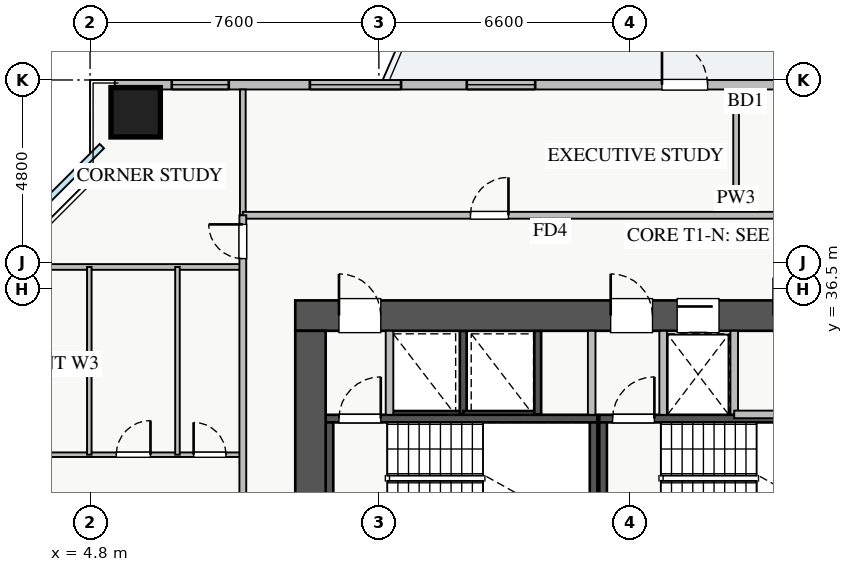
"""IFC4 building model, lengths in metres.
Left out: names, types, materials, properties, quantities, classifications, styles, units other than length and angle.
Written with IfcOpenShell. Run it as: python <this file> out.ifc"""

import sys

from ifc_helpers import new_model, si_unit, direction, frame, frame_2d, origin, origin_2d, place, context, subcontext, project, spatial, rectangle, extrude, source, transform, mapped, element, fill, save


model = new_model("IFC4")
c1 = context("Model", 3, precision=1e-05, world=origin(), true_north=direction((0.0, 1.0)))
c2 = subcontext(c1, "Body", "Model", "MODEL_VIEW")
j1 = project(units=[si_unit("LENGTHUNIT", "METRE"), si_unit("PLANEANGLEUNIT", "RADIAN")], contexts=[c1])
p1 = place(None, origin())
s1 = spatial("IfcSite", under=j1, at=p1, CompositionType="ELEMENT")
p2 = place(p1, origin())
s2 = spatial("IfcBuilding", under=s1, at=p2, CompositionType="ELEMENT")
p3 = place(p2, frame((0.0, 0.0, 56.75)))
s3 = spatial("IfcBuildingStorey", under=s2, at=p3, CompositionType="ELEMENT", Elevation=56.75)
p4 = place(p3, frame((12.68, 33.2, 0.0), z_axis=(0.0, 0.0, 1.0), x_axis=(1.0, 0.0, 0.0)))
e1 = element("IfcWall", 1, at=p4, inside=s3, PredefinedType="SHEAR", context=c2, shape_type="SweptSolid", body=[
    extrude(rectangle(XDim=1.94, YDim=0.18, at=frame_2d((0.97, 0.0))), origin(), (0.0, 0.0, 1.0), 3.07),
])
p5 = place(p3, frame((14.62, 33.2, 0.0), z_axis=(0.0, 0.0, 1.0), x_axis=(0.0, 1.0, 0.0)))
e2 = element("IfcWall", 2, at=p5, inside=s3, PredefinedType="SHEAR", context=c2, shape_type="SweptSolid", body=[
    extrude(rectangle(XDim=2.2, YDim=0.18, at=frame_2d((1.1, 0.0))), origin(), (0.0, 0.0, 1.0), 3.07),
])
p6 = place(p3, frame((14.62, 33.2, 0.0), z_axis=(0.0, 0.0, 1.0), x_axis=(1.0, 0.0, 0.0)))
e3 = element("IfcWall", 3, at=p6, inside=s3, PredefinedType="SHEAR", context=c2, shape_type="SweptSolid", body=[
    extrude(rectangle(XDim=1.96, YDim=0.18, at=frame_2d((0.98, 0.0))), origin(), (0.0, 0.0, 1.0), 3.07),
])
p7 = place(p3, frame((16.58, 33.2, 0.0), z_axis=(0.0, 0.0, 1.0), x_axis=(0.0, 1.0, 0.0)))
e4 = element("IfcWall", 4, at=p7, inside=s3, PredefinedType="SHEAR", context=c2, shape_type="SweptSolid", body=[
    extrude(rectangle(XDim=2.2, YDim=0.18, at=frame_2d((1.1, 0.0))), origin(), (0.0, 0.0, 1.0), 3.07),
])
p8 = place(p3, frame((19.88, 33.2, 0.0), z_axis=(0.0, 0.0, 1.0), x_axis=(1.0, 0.0, 0.0)))
e5 = element("IfcWall", 5, at=p8, inside=s3, PredefinedType="SHEAR", context=c2, shape_type="SweptSolid", body=[
    extrude(rectangle(XDim=1.87, YDim=0.18, at=frame_2d((0.935, 0.0))), origin(), (0.0, 0.0, 1.0), 3.07),
])
p9 = place(p3, frame((11.0, 33.09, 0.0), z_axis=(0.0, 0.0, 1.0), x_axis=(1.0, 0.0, 0.0)))
e6 = element("IfcWall", 6, at=p9, inside=s3, PredefinedType="SHEAR", context=c2, shape_type="SweptSolid", body=[
    extrude(rectangle(XDim=7.15, YDim=0.2, at=frame_2d((3.575, 0.0))), origin(), (0.0, 0.0, 1.0), 3.25),
])
p10 = place(p9, frame((0.35, 0.0, 0.0)))
e7 = element("IfcOpeningElement", 7, at=p10, cuts=e6, PredefinedType="OPENING", context=c2, shape_type="SweptSolid", body=[
    extrude(rectangle(XDim=1.1, YDim=2.05, at=frame_2d((0.55, 1.025))), frame((0.0, 0.11, 0.0), z_axis=(0.0, -1.0, 0.0), x_axis=(1.0, 0.0, 0.0)), (0.0, 0.0, 1.0), 0.22),
])
for number, where, z_axis, x_axis in (
    (8, (11.1, 30.05, 0.0), (0.0, 0.0, 1.0), (0.0, 1.0, 0.0)),
    (9, (18.05, 30.05, 0.0), (0.0, 0.0, 1.0), (0.0, 1.0, 0.0)),
):
    element("IfcWall", number, at=place(p3, frame(where, z_axis=z_axis, x_axis=x_axis)), inside=s3, PredefinedType="SHEAR", context=c2, shape_type="SweptSolid", body=[
        extrude(rectangle(XDim=2.94, YDim=0.2, at=frame_2d((1.47, 0.0))), origin(), (0.0, 0.0, 1.0), 3.25),
    ])
p11 = place(p3, frame((18.2, 33.09, 0.0), z_axis=(0.0, 0.0, 1.0), x_axis=(1.0, 0.0, 0.0)))
e10 = element("IfcWall", 10, at=p11, inside=s3, PredefinedType="SHEAR", context=c2, shape_type="SweptSolid", body=[
    extrude(rectangle(XDim=7.15, YDim=0.2, at=frame_2d((3.575, 0.0))), origin(), (0.0, 0.0, 1.0), 3.25),
])
p12 = place(p11, frame((0.35, 0.0, 0.0)))
e11 = element("IfcOpeningElement", 11, at=p12, cuts=e10, PredefinedType="OPENING", context=c2, shape_type="SweptSolid", body=[
    extrude(rectangle(XDim=1.1, YDim=2.05, at=frame_2d((0.55, 1.025))), frame((0.0, 0.11, 0.0), z_axis=(0.0, -1.0, 0.0), x_axis=(1.0, 0.0, 0.0)), (0.0, 0.0, 1.0), 0.22),
])
p13 = place(p3, frame((18.3, 30.05, 0.0), z_axis=(0.0, 0.0, 1.0), x_axis=(0.0, 1.0, 0.0)))
e12 = element("IfcWall", 12, at=p13, inside=s3, PredefinedType="SHEAR", context=c2, shape_type="SweptSolid", body=[
    extrude(rectangle(XDim=2.94, YDim=0.2, at=frame_2d((1.47, 0.0))), origin(), (0.0, 0.0, 1.0), 3.25),
])
p14 = place(p3, frame((10.2, 35.8, 0.0), z_axis=(0.0, 0.0, 1.0), x_axis=(1.0, 0.0, 0.0)))
e13 = element("IfcWall", 13, at=p14, inside=s3, PredefinedType="SHEAR", context=c2, shape_type="SweptSolid", body=[
    extrude(rectangle(XDim=17.6, YDim=0.8, at=frame_2d((8.8, 0.0))), origin(), (0.0, 0.0, 1.0), 3.25),
])
p15 = place(p14, frame((1.15, 0.0, 0.0)))
e14 = element("IfcOpeningElement", 14, at=p15, cuts=e13, PredefinedType="OPENING", context=c2, shape_type="SweptSolid", body=[
    extrude(rectangle(XDim=1.1, YDim=2.05, at=frame_2d((0.55, 1.025))), frame((0.0, 0.41, 0.0), z_axis=(0.0, -1.0, 0.0), x_axis=(1.0, 0.0, 0.0)), (0.0, 0.0, 1.0), 0.82),
])
p16 = place(p14, frame((8.3, 0.0, 0.0)))
e15 = element("IfcOpeningElement", 15, at=p16, cuts=e13, PredefinedType="OPENING", context=c2, shape_type="SweptSolid", body=[
    extrude(rectangle(XDim=1.1, YDim=2.05, at=frame_2d((0.55, 1.025))), frame((0.0, 0.41, 0.0), z_axis=(0.0, -1.0, 0.0), x_axis=(1.0, 0.0, 0.0)), (0.0, 0.0, 1.0), 0.82),
])
p17 = place(p14, frame((10.05, 0.0, 0.0)))
e16 = element("IfcOpeningElement", 16, at=p17, cuts=e13, PredefinedType="OPENING", context=c2, shape_type="SweptSolid", body=[
    extrude(rectangle(XDim=1.1, YDim=2.05, at=frame_2d((0.55, 1.025))), frame((0.0, 0.41, 0.0), z_axis=(0.0, -1.0, 0.0), x_axis=(1.0, 0.0, 0.0)), (0.0, 0.0, 1.0), 0.82),
])
p18 = place(p14, frame((14.74, 0.0, 0.0)))
e17 = element("IfcOpeningElement", 17, at=p18, cuts=e13, PredefinedType="OPENING", context=c2, shape_type="SweptSolid", body=[
    extrude(rectangle(XDim=1.0, YDim=2.05, at=frame_2d((0.5, 1.025))), frame((0.0, 0.41, 0.0), z_axis=(0.0, -1.0, 0.0), x_axis=(1.0, 0.0, 0.0)), (0.0, 0.0, 1.0), 0.82),
])
p19 = place(p14, frame((12.585, 0.0, 0.0)))
e18 = element("IfcOpeningElement", 18, at=p19, cuts=e13, PredefinedType="OPENING", context=c2, shape_type="SweptSolid", body=[
    extrude(rectangle(XDim=1.0, YDim=2.05, at=frame_2d((0.5, 1.025))), frame((0.0, 0.41, 0.0), z_axis=(0.0, -1.0, 0.0), x_axis=(1.0, 0.0, 0.0)), (0.0, 0.0, 1.0), 0.82),
])
p20 = place(p3, frame((10.6, 29.8, 0.0), z_axis=(0.0, 0.0, 1.0), x_axis=(0.0, 1.0, 0.0)))
e19 = element("IfcWall", 19, at=p20, inside=s3, PredefinedType="SHEAR", context=c2, shape_type="SweptSolid", body=[
    extrude(rectangle(XDim=5.6, YDim=0.8, at=frame_2d((2.8, 0.0))), origin(), (0.0, 0.0, 1.0), 3.25),
])
m1 = source(origin(), c2, "Body", "SweptSolid", [
    extrude(rectangle(XDim=1.3, YDim=1.3, at=origin_2d()), origin(), (0.0, 0.0, 1.0), 3.25),
])
p21 = place(p3, frame((6.0, 41.15, 0.0), z_axis=(0.0, 0.0, 1.0), x_axis=(1.0, 0.0, 0.0)))
e20 = element("IfcColumn", 20, at=p21, inside=s3, PredefinedType="COLUMN", context=c2, shape_type="MappedRepresentation", body=[
    mapped(m1, transform((0.0, 0.0, 0.0), x_axis=(1.0, 0.0, 0.0), y_axis=(0.0, 1.0, 0.0), z_axis=(0.0, 0.0, 1.0), scale=1.0)),
])
p22 = place(p3, frame((5.45, 41.875, 0.0), z_axis=(0.0, 0.0, 1.0), x_axis=(1.0, 0.0, 0.0)))
e21 = element("IfcWall", 21, at=p22, inside=s3, PredefinedType="STANDARD", context=c2, shape_type="SweptSolid", body=[
    extrude(rectangle(XDim=27.1, YDim=0.25, at=frame_2d((13.55, 0.0))), origin(), (0.0, 0.0, 1.0), 2.61),
])
p23 = place(p22, frame((14.4, 0.0, 0.0)))
e22 = element("IfcOpeningElement", 22, at=p23, cuts=e21, PredefinedType="OPENING", context=c2, shape_type="SweptSolid", body=[
    extrude(rectangle(XDim=1.2, YDim=2.1, at=frame_2d((0.6, 1.05))), frame((0.0, 0.135, 0.0), z_axis=(0.0, -1.0, 0.0), x_axis=(1.0, 0.0, 0.0)), (0.0, 0.0, 1.0), 0.27),
])
p24 = place(p22, frame((1.5, 0.0, 0.9)))
e23 = element("IfcOpeningElement", 23, at=p24, cuts=e21, PredefinedType="OPENING", context=c2, shape_type="SweptSolid", body=[
    extrude(rectangle(XDim=1.5, YDim=1.5, at=frame_2d((0.75, 0.75))), frame((0.0, 0.135, 0.0), z_axis=(0.0, -1.0, 0.0), x_axis=(1.0, 0.0, 0.0)), (0.0, 0.0, 1.0), 0.27),
])
p25 = place(p22, frame((9.263, 0.0, 0.9)))
e24 = element("IfcOpeningElement", 24, at=p25, cuts=e21, PredefinedType="OPENING", context=c2, shape_type="SweptSolid", body=[
    extrude(rectangle(XDim=1.8, YDim=1.45, at=frame_2d((0.9, 0.725))), frame((0.0, 0.135, 0.0), z_axis=(0.0, -1.0, 0.0), x_axis=(1.0, 0.0, 0.0)), (0.0, 0.0, 1.0), 0.27),
])
p26 = place(p22, frame((18.774, 0.0, 0.9)))
e25 = element("IfcOpeningElement", 25, at=p26, cuts=e21, PredefinedType="OPENING", context=c2, shape_type="SweptSolid", body=[
    extrude(rectangle(XDim=1.5, YDim=1.5, at=frame_2d((0.75, 0.75))), frame((0.0, 0.135, 0.0), z_axis=(0.0, -1.0, 0.0), x_axis=(1.0, 0.0, 0.0)), (0.0, 0.0, 1.0), 0.27),
])
p27 = place(p22, frame((22.663, 0.0, 0.9)))
e26 = element("IfcOpeningElement", 26, at=p27, cuts=e21, PredefinedType="OPENING", context=c2, shape_type="SweptSolid", body=[
    extrude(rectangle(XDim=2.1, YDim=1.48, at=frame_2d((1.05, 0.74))), frame((0.0, 0.135, 0.0), z_axis=(0.0, -1.0, 0.0), x_axis=(1.0, 0.0, 0.0)), (0.0, 0.0, 1.0), 0.27),
])
p28 = place(p22, frame((5.134, 0.0, 0.9)))
e27 = element("IfcOpeningElement", 27, at=p28, cuts=e21, PredefinedType="OPENING", context=c2, shape_type="SweptSolid", body=[
    extrude(rectangle(XDim=2.4, YDim=1.5, at=frame_2d((1.2, 0.75))), frame((0.0, 0.135, 0.0), z_axis=(0.0, -1.0, 0.0), x_axis=(1.0, 0.0, 0.0)), (0.0, 0.0, 1.0), 0.27),
])
for number, where, z_axis, x_axis in (
    (28, (12.68, 33.19, 0.0), (0.0, 0.0, 1.0), (0.0, 1.0, 0.0)),
    (29, (18.0, 33.19, 0.0), (0.0, 0.0, 1.0), (0.0, 1.0, 0.0)),
    (30, (19.88, 33.19, 0.0), (0.0, 0.0, 1.0), (0.0, 1.0, 0.0)),
):
    element("IfcWall", number, at=place(p3, frame(where, z_axis=z_axis, x_axis=x_axis)), inside=s3, PredefinedType="PARTITIONING", context=c2, shape_type="SweptSolid", body=[
        extrude(rectangle(XDim=2.21, YDim=0.2, at=frame_2d((1.105, 0.0))), origin(), (0.0, 0.0, 1.0), 3.07),
    ])
p29 = place(p3, frame((21.75, 33.2, 0.0), z_axis=(0.0, 0.0, 1.0), x_axis=(0.0, 1.0, 0.0)))
e31 = element("IfcWall", 31, at=p29, inside=s3, PredefinedType="PARTITIONING", context=c2, shape_type="SweptSolid", body=[
    extrude(rectangle(XDim=2.2, YDim=0.2, at=frame_2d((1.1, 0.0))), origin(), (0.0, 0.0, 1.0), 3.07),
])
p30 = place(p3, frame((21.75, 33.2, 0.0), z_axis=(0.0, 0.0, 1.0), x_axis=(1.0, 0.0, 0.0)))
e32 = element("IfcWall", 32, at=p30, inside=s3, PredefinedType="PARTITIONING", context=c2, shape_type="SweptSolid", body=[
    extrude(rectangle(XDim=5.17, YDim=0.2, at=frame_2d((2.585, 0.0))), origin(), (0.0, 0.0, 1.0), 3.07),
])
for number, where, z_axis, x_axis in (
    (33, (21.8, 38.44, 0.0), (0.0, 0.0, 1.0), (0.0, 1.0, 0.0)),
    (34, (8.82, 38.44, 0.0), (0.0, 0.0, 1.0), (0.0, 1.0, 0.0)),
):
    element("IfcWall", number, at=place(p3, frame(where, z_axis=z_axis, x_axis=x_axis)), inside=s3, PredefinedType="PARTITIONING", context=c2, shape_type="SweptSolid", body=[
        extrude(rectangle(XDim=3.31, YDim=0.15, at=frame_2d((1.655, 0.0))), origin(), (0.0, 0.0, 1.0), 3.07),
    ])
p31 = place(p3, frame((8.82, 38.44, 0.0), z_axis=(0.0, 0.0, 1.0), x_axis=(1.0, 0.0, 0.0)))
e35 = element("IfcWall", 35, at=p31, inside=s3, PredefinedType="PARTITIONING", context=c2, shape_type="SweptSolid", body=[
    extrude(rectangle(XDim=23.58, YDim=0.18, at=frame_2d((11.79, 0.0))), origin(), (0.0, 0.0, 1.0), 3.07),
])
p32 = place(p31, frame((5.99, 0.0, 0.0)))
e36 = element("IfcOpeningElement", 36, at=p32, cuts=e35, PredefinedType="OPENING", context=c2, shape_type="SweptSolid", body=[
    extrude(rectangle(XDim=1.0, YDim=2.05, at=frame_2d((0.5, 1.025))), frame((0.0, 0.1, 0.0), z_axis=(0.0, -1.0, 0.0), x_axis=(1.0, 0.0, 0.0)), (0.0, 0.0, 1.0), 0.2),
])
p33 = place(p31, frame((17.78, 0.0, 0.0)))
e37 = element("IfcOpeningElement", 37, at=p33, cuts=e35, PredefinedType="OPENING", context=c2, shape_type="SweptSolid", body=[
    extrude(rectangle(XDim=1.0, YDim=2.05, at=frame_2d((0.5, 1.025))), frame((0.0, 0.1, 0.0), z_axis=(0.0, -1.0, 0.0), x_axis=(1.0, 0.0, 0.0)), (0.0, 0.0, 1.0), 0.2),
])
p34 = place(p3, frame((0.25, 37.08, 0.0), z_axis=(0.0, 0.0, 1.0), x_axis=(1.0, 0.0, 0.0)))
e38 = element("IfcWall", 38, at=p34, inside=s3, PredefinedType="PARTITIONING", context=c2, shape_type="SweptSolid", body=[
    extrude(rectangle(XDim=8.57, YDim=0.15, at=frame_2d((4.285, 0.0))), origin(), (0.0, 0.0, 1.0), 3.07),
])
p35 = place(p3, frame((0.25, 32.14, 0.0), z_axis=(0.0, 0.0, 1.0), x_axis=(1.0, 0.0, 0.0)))
e39 = element("IfcWall", 39, at=p35, inside=s3, PredefinedType="PLUMBINGWALL", context=c2, shape_type="SweptSolid", body=[
    extrude(rectangle(XDim=8.57, YDim=0.12, at=frame_2d((4.285, 0.0))), origin(), (0.0, 0.0, 1.0), 3.07),
])
p36 = place(p35, frame((1.825, 0.0, 0.0)))
e40 = element("IfcOpeningElement", 40, at=p36, cuts=e39, PredefinedType="OPENING", context=c2, shape_type="SweptSolid", body=[
    extrude(rectangle(XDim=0.9, YDim=2.05, at=frame_2d((0.45, 1.025))), frame((0.0, 0.07, 0.0), z_axis=(0.0, -1.0, 0.0), x_axis=(1.0, 0.0, 0.0)), (0.0, 0.0, 1.0), 0.14),
])
p37 = place(p35, frame((5.24, 0.0, 0.0)))
e41 = element("IfcOpeningElement", 41, at=p37, cuts=e39, PredefinedType="OPENING", context=c2, shape_type="SweptSolid", body=[
    extrude(rectangle(XDim=0.9, YDim=2.05, at=frame_2d((0.45, 1.025))), frame((0.0, 0.07, 0.0), z_axis=(0.0, -1.0, 0.0), x_axis=(1.0, 0.0, 0.0)), (0.0, 0.0, 1.0), 0.14),
])
p38 = place(p35, frame((7.275, 0.0, 0.0)))
e42 = element("IfcOpeningElement", 42, at=p38, cuts=e39, PredefinedType="OPENING", context=c2, shape_type="SweptSolid", body=[
    extrude(rectangle(XDim=0.85, YDim=2.05, at=frame_2d((0.425, 1.025))), frame((0.0, 0.07, 0.0), z_axis=(0.0, -1.0, 0.0), x_axis=(1.0, 0.0, 0.0)), (0.0, 0.0, 1.0), 0.14),
])
for number, where, z_axis, x_axis in (
    (43, (4.78, 32.14, 0.0), (0.0, 0.0, 1.0), (0.0, 1.0, 0.0)),
    (44, (7.1, 32.14, 0.0), (0.0, 0.0, 1.0), (0.0, 1.0, 0.0)),
):
    element("IfcWall", number, at=place(p3, frame(where, z_axis=z_axis, x_axis=x_axis)), inside=s3, PredefinedType="PLUMBINGWALL", context=c2, shape_type="SweptSolid", body=[
        extrude(rectangle(XDim=4.94, YDim=0.12, at=frame_2d((2.47, 0.0))), origin(), (0.0, 0.0, 1.0), 3.07),
    ])
p39 = place(p3, frame((8.82, 7.21, 0.0), z_axis=(0.0, 0.0, 1.0), x_axis=(0.0, 1.0, 0.0)))
e45 = element("IfcWall", 45, at=p39, inside=s3, PredefinedType="PARTITIONING", context=c2, shape_type="SweptSolid", body=[
    extrude(rectangle(XDim=31.23, YDim=0.18, at=frame_2d((15.615, 0.0))), origin(), (0.0, 0.0, 1.0), 3.07),
])
p40 = place(p39, frame((30.09, 0.0, 0.0)))
e46 = element("IfcOpeningElement", 46, at=p40, cuts=e45, PredefinedType="OPENING", context=c2, shape_type="SweptSolid", body=[
    extrude(rectangle(XDim=0.9, YDim=2.05, at=frame_2d((0.45, 1.025))), frame((0.0, 0.1, 0.0), z_axis=(0.0, -1.0, 0.0), x_axis=(1.0, 0.0, 0.0)), (0.0, 0.0, 1.0), 0.2),
])
p41 = place(p39, frame((0.24, 0.0, 0.0)))
e47 = element("IfcOpeningElement", 47, at=p41, cuts=e45, PredefinedType="OPENING", context=c2, shape_type="SweptSolid", body=[
    extrude(rectangle(XDim=0.9, YDim=2.05, at=frame_2d((0.45, 1.025))), frame((0.0, 0.1, 0.0), z_axis=(0.0, -1.0, 0.0), x_axis=(1.0, 0.0, 0.0)), (0.0, 0.0, 1.0), 0.2),
])
p42 = place(p39, frame((2.95, 0.0, 0.0)))
e48 = element("IfcOpeningElement", 48, at=p42, cuts=e45, PredefinedType="OPENING", context=c2, shape_type="SweptSolid", body=[
    extrude(rectangle(XDim=1.0, YDim=2.05, at=frame_2d((0.5, 1.025))), frame((0.0, 0.1, 0.0), z_axis=(0.0, -1.0, 0.0), x_axis=(1.0, 0.0, 0.0)), (0.0, 0.0, 1.0), 0.2),
])
p43 = place(p39, frame((15.115, 0.0, 0.0)))
e49 = element("IfcOpeningElement", 49, at=p43, cuts=e45, PredefinedType="OPENING", context=c2, shape_type="SweptSolid", body=[
    extrude(rectangle(XDim=1.0, YDim=2.05, at=frame_2d((0.5, 1.025))), frame((0.0, 0.1, 0.0), z_axis=(0.0, -1.0, 0.0), x_axis=(1.0, 0.0, 0.0)), (0.0, 0.0, 1.0), 0.2),
])
p44 = place(p39, frame((21.96, 0.0, 0.0)))
e50 = element("IfcOpeningElement", 50, at=p44, cuts=e45, PredefinedType="OPENING", context=c2, shape_type="SweptSolid", body=[
    extrude(rectangle(XDim=1.0, YDim=2.05, at=frame_2d((0.5, 1.025))), frame((0.0, 0.1, 0.0), z_axis=(0.0, -1.0, 0.0), x_axis=(1.0, 0.0, 0.0)), (0.0, 0.0, 1.0), 0.2),
])
m2 = source(origin(), c2, "Body", "SweptSolid", [
    extrude(rectangle(XDim=1.2, YDim=2.1, at=frame_2d((0.6, 1.05))), frame((0.0, 0.025, 0.0), z_axis=(0.0, -1.0, 0.0), x_axis=(1.0, 0.0, 0.0)), (0.0, 0.0, 1.0), 0.05),
])
p45 = place(p23, origin())
e51 = element("IfcDoor", 51, at=p45, inside=s3, OperationType="SINGLE_SWING_LEFT", PredefinedType="DOOR", context=c2, shape_type="MappedRepresentation", body=[
    mapped(m2, transform((0.0, 0.0, 0.0), x_axis=(1.0, 0.0, 0.0), y_axis=(0.0, 1.0, 0.0), z_axis=(0.0, 0.0, 1.0), scale=1.0)),
])
fill(e22, e51)
m3 = source(origin(), c2, "Body", "SweptSolid", [
    extrude(rectangle(XDim=1.5, YDim=1.5, at=frame_2d((0.75, 0.75))), frame((0.0, 0.03, 0.0), z_axis=(0.0, -1.0, 0.0), x_axis=(1.0, 0.0, 0.0)), (0.0, 0.0, 1.0), 0.06),
])
p46 = place(p24, origin())
e52 = element("IfcWindow", 52, at=p46, inside=s3, PartitioningType="TRIPLE_PANEL_VERTICAL", PredefinedType="WINDOW", context=c2, shape_type="MappedRepresentation", body=[
    mapped(m3, transform((0.0, 0.0, 0.0), x_axis=(1.0, 0.0, 0.0), y_axis=(0.0, 1.0, 0.0), z_axis=(0.0, 0.0, 1.0), scale=1.0)),
])
fill(e23, e52)
m4 = source(origin(), c2, "Body", "SweptSolid", [
    extrude(rectangle(XDim=1.8, YDim=1.45, at=frame_2d((0.9, 0.725))), frame((0.0, 0.03, 0.0), z_axis=(0.0, -1.0, 0.0), x_axis=(1.0, 0.0, 0.0)), (0.0, 0.0, 1.0), 0.06),
])
p47 = place(p25, origin())
e53 = element("IfcWindow", 53, at=p47, inside=s3, PartitioningType="DOUBLE_PANEL_VERTICAL", PredefinedType="WINDOW", context=c2, shape_type="MappedRepresentation", body=[
    mapped(m4, transform((0.0, 0.0, 0.0), x_axis=(1.0, 0.0, 0.0), y_axis=(0.0, 1.0, 0.0), z_axis=(0.0, 0.0, 1.0), scale=1.0)),
])
fill(e24, e53)
m5 = source(origin(), c2, "Body", "SweptSolid", [
    extrude(rectangle(XDim=1.1, YDim=2.05, at=frame_2d((0.55, 1.025))), frame((0.0, 0.025, 0.0), z_axis=(0.0, -1.0, 0.0), x_axis=(1.0, 0.0, 0.0)), (0.0, 0.0, 1.0), 0.05),
])
p48 = place(p15, origin())
e54 = element("IfcDoor", 54, at=p48, inside=s3, OperationType="SINGLE_SWING_LEFT", PredefinedType="DOOR", context=c2, shape_type="MappedRepresentation", body=[
    mapped(m5, transform((0.0, 0.0, 0.0), x_axis=(1.0, 0.0, 0.0), y_axis=(0.0, 1.0, 0.0), z_axis=(0.0, 0.0, 1.0), scale=1.0)),
])
fill(e14, e54)
p49 = place(p10, origin())
e55 = element("IfcDoor", 55, at=p49, inside=s3, OperationType="SINGLE_SWING_RIGHT", PredefinedType="DOOR", context=c2, shape_type="MappedRepresentation", body=[
    mapped(m5, transform((0.0, 0.0, 0.0), x_axis=(1.0, 0.0, 0.0), y_axis=(0.0, 1.0, 0.0), z_axis=(0.0, 0.0, 1.0), scale=1.0)),
])
fill(e7, e55)
p50 = place(p16, origin())
e56 = element("IfcDoor", 56, at=p50, inside=s3, OperationType="SINGLE_SWING_LEFT", PredefinedType="DOOR", context=c2, shape_type="MappedRepresentation", body=[
    mapped(m5, transform((0.0, 0.0, 0.0), x_axis=(1.0, 0.0, 0.0), y_axis=(0.0, 1.0, 0.0), z_axis=(0.0, 0.0, 1.0), scale=1.0)),
])
fill(e15, e56)
p51 = place(p12, origin())
e57 = element("IfcDoor", 57, at=p51, inside=s3, OperationType="SINGLE_SWING_RIGHT", PredefinedType="DOOR", context=c2, shape_type="MappedRepresentation", body=[
    mapped(m5, transform((0.0, 0.0, 0.0), x_axis=(1.0, 0.0, 0.0), y_axis=(0.0, 1.0, 0.0), z_axis=(0.0, 0.0, 1.0), scale=1.0)),
])
fill(e11, e57)
p52 = place(p17, origin())
e58 = element("IfcDoor", 58, at=p52, inside=s3, OperationType="SLIDING_TO_LEFT", PredefinedType="DOOR", context=c2, shape_type="MappedRepresentation", body=[
    mapped(m5, transform((0.0, 0.0, 0.0), x_axis=(1.0, 0.0, 0.0), y_axis=(0.0, 1.0, 0.0), z_axis=(0.0, 0.0, 1.0), scale=1.0)),
])
fill(e16, e58)
m6 = source(origin(), c2, "Body", "SweptSolid", [
    extrude(rectangle(XDim=1.0, YDim=2.05, at=frame_2d((0.5, 1.025))), frame((0.0, 0.025, 0.0), z_axis=(0.0, -1.0, 0.0), x_axis=(1.0, 0.0, 0.0)), (0.0, 0.0, 1.0), 0.05),
])
p53 = place(p32, origin())
e59 = element("IfcDoor", 59, at=p53, inside=s3, OperationType="SINGLE_SWING_RIGHT", PredefinedType="DOOR", context=c2, shape_type="MappedRepresentation", body=[
    mapped(m6, transform((0.0, 0.0, 0.0), x_axis=(1.0, 0.0, 0.0), y_axis=(0.0, 1.0, 0.0), z_axis=(0.0, 0.0, 1.0), scale=1.0)),
])
fill(e36, e59)
m7 = source(origin(), c2, "Body", "SweptSolid", [
    extrude(rectangle(XDim=0.9, YDim=2.05, at=frame_2d((0.45, 1.025))), frame((0.0, 0.025, 0.0), z_axis=(0.0, -1.0, 0.0), x_axis=(1.0, 0.0, 0.0)), (0.0, 0.0, 1.0), 0.05),
])
p54 = place(p37, origin())
e60 = element("IfcDoor", 60, at=p54, inside=s3, OperationType="SINGLE_SWING_RIGHT", PredefinedType="DOOR", context=c2, shape_type="MappedRepresentation", body=[
    mapped(m7, transform((0.0, 0.0, 0.0), x_axis=(1.0, 0.0, 0.0), y_axis=(0.0, 1.0, 0.0), z_axis=(0.0, 0.0, 1.0), scale=1.0)),
])
fill(e41, e60)
m8 = source(origin(), c2, "Body", "SweptSolid", [
    extrude(rectangle(XDim=0.85, YDim=2.05, at=frame_2d((0.425, 1.025))), frame((0.0, 0.025, 0.0), z_axis=(0.0, -1.0, 0.0), x_axis=(1.0, 0.0, 0.0)), (0.0, 0.0, 1.0), 0.05),
])
p55 = place(p38, origin())
e61 = element("IfcDoor", 61, at=p55, inside=s3, OperationType="SINGLE_SWING_LEFT", PredefinedType="DOOR", context=c2, shape_type="MappedRepresentation", body=[
    mapped(m8, transform((0.0, 0.0, 0.0), x_axis=(1.0, 0.0, 0.0), y_axis=(0.0, 1.0, 0.0), z_axis=(0.0, 0.0, 1.0), scale=1.0)),
])
fill(e42, e61)
p56 = place(p40, origin())
e62 = element("IfcDoor", 62, at=p56, inside=s3, OperationType="SINGLE_SWING_RIGHT", PredefinedType="DOOR", context=c2, shape_type="MappedRepresentation", body=[
    mapped(m7, transform((0.0, 0.0, 0.0), x_axis=(1.0, 0.0, 0.0), y_axis=(0.0, 1.0, 0.0), z_axis=(0.0, 0.0, 1.0), scale=1.0)),
])
fill(e46, e62)
m9 = source(origin(), c2, "Body", "SweptSolid", [
    extrude(rectangle(XDim=2.4, YDim=1.5, at=frame_2d((1.2, 0.75))), frame((0.0, 0.03, 0.0), z_axis=(0.0, -1.0, 0.0), x_axis=(1.0, 0.0, 0.0)), (0.0, 0.0, 1.0), 0.06),
])
p57 = place(p28, origin())
e63 = element("IfcWindow", 63, at=p57, inside=s3, PartitioningType="TRIPLE_PANEL_VERTICAL", PredefinedType="WINDOW", context=c2, shape_type="MappedRepresentation", body=[
    mapped(m9, transform((0.0, 0.0, 0.0), x_axis=(1.0, 0.0, 0.0), y_axis=(0.0, 1.0, 0.0), z_axis=(0.0, 0.0, 1.0), scale=1.0)),
])
fill(e27, e63)
save(model, sys.argv[1])
